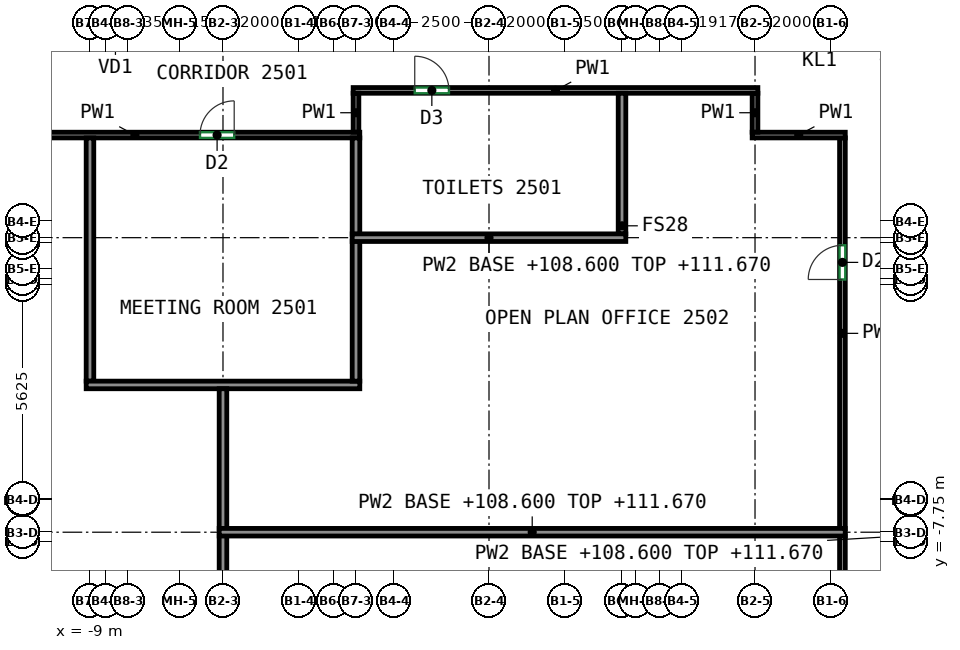
"""IFC4 building model, lengths in metres.
Left out: names, types, materials, properties, quantities, classifications, styles, units other than length and angle.
Written with IfcOpenShell. Run it as: python <this file> out.ifc"""

import sys

from ifc_helpers import new_model, si_unit, direction, frame, frame_2d, origin, place, context, subcontext, project, spatial, rectangle, extrude, element, fill, save


model = new_model("IFC4")
c1 = context("Model", 3, precision=1e-05, world=origin(), true_north=direction((0.0, 1.0)))
c2 = subcontext(c1, "Body", "Model", "MODEL_VIEW")
j1 = project(units=[si_unit("LENGTHUNIT", "METRE"), si_unit("PLANEANGLEUNIT", "RADIAN")], contexts=[c1])
p1 = place(None, origin())
s1 = spatial("IfcSite", under=j1, at=p1, CompositionType="ELEMENT")
p2 = place(p1, origin())
s2 = spatial("IfcBuilding", under=s1, at=p2, CompositionType="ELEMENT")
p3 = place(p2, frame((0.0, 0.0, 108.6)))
s3 = spatial("IfcBuildingStorey", under=s2, at=p3, CompositionType="ELEMENT", Elevation=108.6)
p4 = place(p3, frame((-13.735, 2.95, 0.0), z_axis=(0.0, 0.0, 1.0), x_axis=(1.0, 0.0, 0.0)))
e1 = element("IfcWall", 1, at=p4, inside=s3, PredefinedType="PARTITIONING", context=c2, shape_type="SweptSolid", body=[
    extrude(rectangle(XDim=11.835, YDim=0.15, at=frame_2d((5.917, 0.0))), origin(), (0.0, 0.0, 1.0), 3.72),
])
p5 = place(p4, frame((7.63, 0.0, 0.0)))
e2 = element("IfcOpeningElement", 2, at=p5, cuts=e1, PredefinedType="OPENING", context=c2, shape_type="SweptSolid", body=[
    extrude(rectangle(XDim=0.9, YDim=2.1, at=frame_2d((0.45, 1.05))), frame((0.0, 0.085, 0.0), z_axis=(0.0, -1.0, 0.0), x_axis=(1.0, 0.0, 0.0)), (0.0, 0.0, 1.0), 0.17),
])
p6 = place(p3, frame((-2.075, 4.125, 0.0), z_axis=(0.0, 0.0, 1.0), x_axis=(1.0, 0.0, 0.0)))
e3 = element("IfcWall", 3, at=p6, inside=s3, PredefinedType="PARTITIONING", context=c2, shape_type="SweptSolid", body=[
    extrude(rectangle(XDim=10.65, YDim=0.15, at=frame_2d((5.325, 0.0))), origin(), (0.0, 0.0, 1.0), 3.72),
])
p7 = place(p6, frame((1.621, 0.0, 0.0)))
e4 = element("IfcOpeningElement", 4, at=p7, cuts=e3, PredefinedType="OPENING", context=c2, shape_type="SweptSolid", body=[
    extrude(rectangle(XDim=0.9, YDim=2.1, at=frame_2d((0.45, 1.05))), frame((0.0, 0.085, 0.0), z_axis=(0.0, -1.0, 0.0), x_axis=(1.0, 0.0, 0.0)), (0.0, 0.0, 1.0), 0.17),
])
p8 = place(p3, frame((-2.0, 3.025, 0.0), z_axis=(0.0, 0.0, 1.0), x_axis=(0.0, 1.0, 0.0)))
e5 = element("IfcWall", 5, at=p8, inside=s3, PredefinedType="PARTITIONING", context=c2, shape_type="SweptSolid", body=[
    extrude(rectangle(XDim=1.025, YDim=0.15, at=frame_2d((0.513, 0.0))), origin(), (0.0, 0.0, 1.0), 3.72),
])
p9 = place(p3, frame((10.8, -15.625, 0.0), z_axis=(0.0, 0.0, 1.0), x_axis=(0.0, 1.0, 0.0)))
e6 = element("IfcWall", 6, at=p9, inside=s3, PredefinedType="PARTITIONING", context=c2, shape_type="SweptSolid", body=[
    extrude(rectangle(XDim=8.035, YDim=0.15, at=frame_2d((4.018, 0.0))), origin(), (0.0, 0.0, 1.0), 3.72),
])
p10 = place(p9, frame((0.502, 0.0, 0.0)))
e7 = element("IfcOpeningElement", 7, at=p10, cuts=e6, PredefinedType="OPENING", context=c2, shape_type="SweptSolid", body=[
    extrude(rectangle(XDim=0.9, YDim=2.1, at=frame_2d((0.45, 1.05))), frame((0.0, 0.085, 0.0), z_axis=(0.0, -1.0, 0.0), x_axis=(1.0, 0.0, 0.0)), (0.0, 0.0, 1.0), 0.17),
])
p11 = place(p3, frame((10.8, -7.41, 0.0), z_axis=(0.0, 0.0, 1.0), x_axis=(0.0, 1.0, 0.0)))
e8 = element("IfcWall", 8, at=p11, inside=s3, PredefinedType="PARTITIONING", context=c2, shape_type="SweptSolid", body=[
    extrude(rectangle(XDim=10.285, YDim=0.15, at=frame_2d((5.143, 0.0))), origin(), (0.0, 0.0, 1.0), 3.72),
])
p12 = place(p11, frame((6.56, 0.0, 0.0)))
e9 = element("IfcOpeningElement", 9, at=p12, cuts=e8, PredefinedType="OPENING", context=c2, shape_type="SweptSolid", body=[
    extrude(rectangle(XDim=0.9, YDim=2.1, at=frame_2d((0.45, 1.05))), frame((0.0, 0.085, 0.0), z_axis=(0.0, -1.0, 0.0), x_axis=(1.0, 0.0, 0.0)), (0.0, 0.0, 1.0), 0.17),
])
p13 = place(p3, frame((8.425, 2.95, 0.0), z_axis=(0.0, 0.0, 1.0), x_axis=(1.0, 0.0, 0.0)))
e10 = element("IfcWall", 10, at=p13, inside=s3, PredefinedType="PARTITIONING", context=c2, shape_type="SweptSolid", body=[
    extrude(rectangle(XDim=2.45, YDim=0.15, at=frame_2d((1.225, 0.0))), origin(), (0.0, 0.0, 1.0), 3.72),
])
p14 = place(p3, frame((8.5, 4.05, 0.0), z_axis=(0.0, 0.0, 1.0), x_axis=(0.0, -1.0, 0.0)))
e11 = element("IfcWall", 11, at=p14, inside=s3, PredefinedType="PARTITIONING", context=c2, shape_type="SweptSolid", body=[
    extrude(rectangle(XDim=1.025, YDim=0.15, at=frame_2d((0.513, 0.0))), origin(), (0.0, 0.0, 1.0), 3.72),
])
p15 = place(p3, frame((-9.0, -3.525, 0.0), z_axis=(0.0, 0.0, 1.0), x_axis=(0.0, 1.0, 0.0)))
e12 = element("IfcWall", 12, at=p15, inside=s3, PredefinedType="PARTITIONING", context=c2, shape_type="SweptSolid", body=[
    extrude(rectangle(XDim=6.399, YDim=0.2, at=frame_2d((3.199, 0.0))), origin(), (0.0, 0.0, 1.0), 3.72),
])
p16 = place(p3, frame((-9.1, -3.625, 0.0), z_axis=(0.0, 0.0, 1.0), x_axis=(1.0, 0.0, 0.0)))
e13 = element("IfcWall", 13, at=p16, inside=s3, PredefinedType="PARTITIONING", context=c2, shape_type="SweptSolid", body=[
    extrude(rectangle(XDim=7.2, YDim=0.2, at=frame_2d((3.6, 0.0))), origin(), (0.0, 0.0, 1.0), 3.72),
])
p17 = place(p3, frame((-5.5, -14.65, 0.0), z_axis=(0.0, 0.0, 1.0), x_axis=(0.0, 1.0, 0.0)))
e14 = element("IfcWall", 14, at=p17, inside=s3, PredefinedType="PARTITIONING", context=c2, shape_type="SweptSolid", body=[
    extrude(rectangle(XDim=7.06, YDim=0.2, at=frame_2d((3.53, 0.0))), origin(), (0.0, 0.0, 1.0), 3.72),
])
p18 = place(p3, frame((-5.5, -7.41, 0.0), z_axis=(0.0, 0.0, 1.0), x_axis=(0.0, 1.0, 0.0)))
e15 = element("IfcWall", 15, at=p18, inside=s3, PredefinedType="PARTITIONING", context=c2, shape_type="SweptSolid", body=[
    extrude(rectangle(XDim=3.685, YDim=0.2, at=frame_2d((1.842, 0.0))), origin(), (0.0, 0.0, 1.0), 3.72),
])
p19 = place(p3, frame((-2.0, 0.34, 0.0), z_axis=(0.0, 0.0, 1.0), x_axis=(0.0, 1.0, 0.0)))
e16 = element("IfcWall", 16, at=p19, inside=s3, PredefinedType="PARTITIONING", context=c2, shape_type="SweptSolid", body=[
    extrude(rectangle(XDim=2.534, YDim=0.2, at=frame_2d((1.267, 0.0))), origin(), (0.0, 0.0, 1.0), 3.72),
])
p20 = place(p3, frame((-2.0, -3.525, 0.0), z_axis=(0.0, 0.0, 1.0), x_axis=(0.0, 1.0, 0.0)))
e17 = element("IfcWall", 17, at=p20, inside=s3, PredefinedType="PARTITIONING", context=c2, shape_type="SweptSolid", body=[
    extrude(rectangle(XDim=3.685, YDim=0.2, at=frame_2d((1.842, 0.0))), origin(), (0.0, 0.0, 1.0), 3.72),
])
p21 = place(p3, frame((5.0, 0.35, 0.0), z_axis=(0.0, 0.0, 1.0), x_axis=(0.0, 1.0, 0.0)))
e18 = element("IfcWall", 18, at=p21, inside=s3, PredefinedType="PARTITIONING", context=c2, shape_type="SweptSolid", body=[
    extrude(rectangle(XDim=3.699, YDim=0.2, at=frame_2d((1.85, 0.0))), origin(), (0.0, 0.0, 1.0), 3.72),
])
p22 = place(p3, frame((-2.1, 0.25, 0.0), z_axis=(0.0, 0.0, 1.0), x_axis=(1.0, 0.0, 0.0)))
e19 = element("IfcWall", 19, at=p22, inside=s3, PredefinedType="PARTITIONING", context=c2, shape_type="SweptSolid", body=[
    extrude(rectangle(XDim=7.2, YDim=0.2, at=frame_2d((3.6, 0.0))), origin(), (0.0, 0.0, 1.0), 3.07),
])
p23 = place(p3, frame((-5.6, -7.5, 0.0), z_axis=(0.0, 0.0, 1.0), x_axis=(1.0, 0.0, 0.0)))
e20 = element("IfcWall", 20, at=p23, inside=s3, PredefinedType="PARTITIONING", context=c2, shape_type="SweptSolid", body=[
    extrude(rectangle(XDim=16.474, YDim=0.2, at=frame_2d((8.237, 0.0))), origin(), (0.0, 0.0, 1.0), 3.07),
])
p24 = place(p12, origin())
e21 = element("IfcDoor", 21, at=p24, inside=s3, OperationType="SINGLE_SWING_LEFT", PredefinedType="DOOR", context=c2, shape_type="SweptSolid", body=[
    extrude(rectangle(XDim=0.9, YDim=2.1, at=frame_2d((0.45, 1.05))), frame((0.0, 0.025, 0.0), z_axis=(0.0, -1.0, 0.0), x_axis=(1.0, 0.0, 0.0)), (0.0, 0.0, 1.0), 0.05),
])
fill(e9, e21)
p25 = place(p5, origin())
e22 = element("IfcDoor", 22, at=p25, inside=s3, OperationType="SINGLE_SWING_RIGHT", PredefinedType="DOOR", context=c2, shape_type="SweptSolid", body=[
    extrude(rectangle(XDim=0.9, YDim=2.1, at=frame_2d((0.45, 1.05))), frame((0.0, 0.025, 0.0), z_axis=(0.0, -1.0, 0.0), x_axis=(1.0, 0.0, 0.0)), (0.0, 0.0, 1.0), 0.05),
])
fill(e2, e22)
p26 = place(p7, origin())
e23 = element("IfcDoor", 23, at=p26, inside=s3, OperationType="SINGLE_SWING_LEFT", PredefinedType="DOOR", context=c2, shape_type="SweptSolid", body=[
    extrude(rectangle(XDim=0.9, YDim=2.1, at=frame_2d((0.45, 1.05))), frame((0.0, 0.025, 0.0), z_axis=(0.0, -1.0, 0.0), x_axis=(1.0, 0.0, 0.0)), (0.0, 0.0, 1.0), 0.05),
])
fill(e4, e23)
save(model, sys.argv[1])
